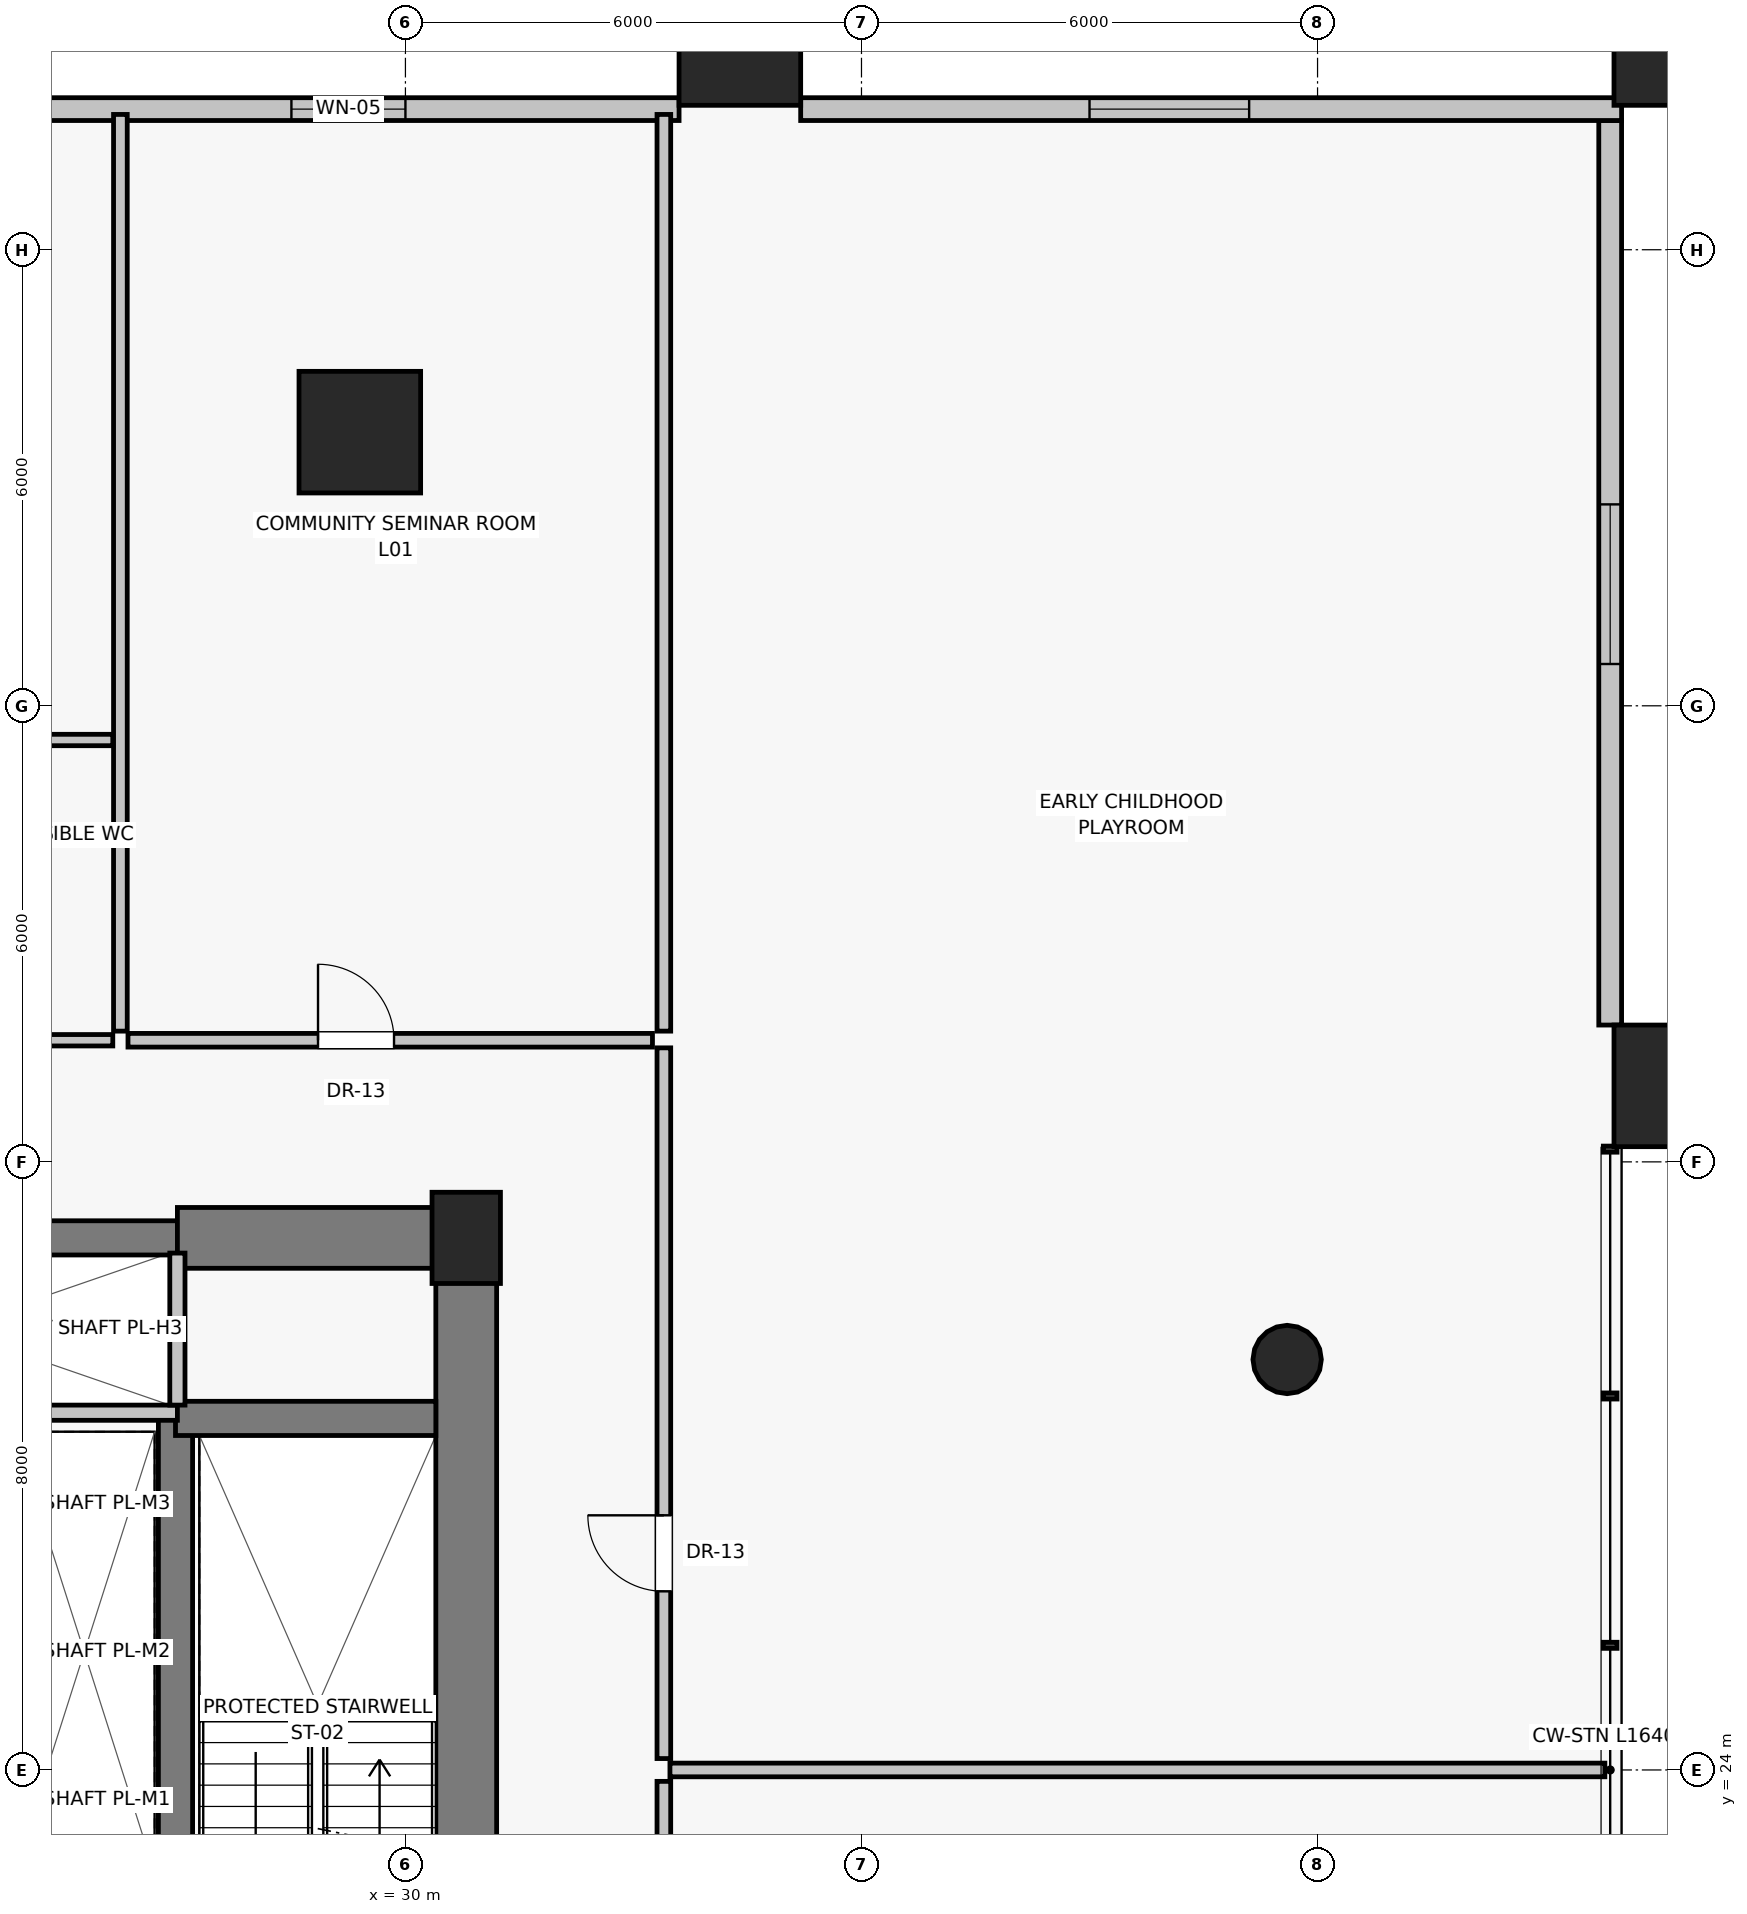
"""IFC4 building model, lengths in metres.
Left out: names, types, materials, properties, quantities, classifications, styles, units other than length and angle.
Written with IfcOpenShell. Run it as: python <this file> out.ifc"""

import sys

from ifc_helpers import new_model, si_unit, direction, frame, frame_2d, origin, origin_2d, place, context, subcontext, project, spatial, rectangle, circle, extrude, source, transform, mapped, element, fill, save


model = new_model("IFC4")
c1 = context("Model", 3, precision=1e-05, world=origin(), true_north=direction((0.0, 1.0)))
c2 = subcontext(c1, "Body", "Model", "MODEL_VIEW")
j1 = project(units=[si_unit("LENGTHUNIT", "METRE"), si_unit("PLANEANGLEUNIT", "RADIAN")], contexts=[c1])
p1 = place(None, origin())
s1 = spatial("IfcSite", under=j1, at=p1, CompositionType="ELEMENT")
p2 = place(p1, origin())
s2 = spatial("IfcBuilding", under=s1, at=p2, CompositionType="ELEMENT")
p3 = place(p2, frame((0.0, 0.0, 5.2)))
s3 = spatial("IfcBuildingStorey", under=s2, at=p3, CompositionType="ELEMENT", Elevation=5.2)
p4 = place(p3, frame((30.8, 31.0, 0.0), z_axis=(0.0, 0.0, 1.0), x_axis=(1.0, 0.0, 0.0)))
e1 = element("IfcColumn", 1, at=p4, inside=s3, PredefinedType="PILASTER", context=c2, shape_type="SweptSolid", body=[
    extrude(rectangle(XDim=0.9, YDim=1.2, at=origin_2d()), origin(), (0.0, 0.0, 1.0), 4.4),
])
for number, where, z_axis, x_axis in (
    (2, (46.7, 33.0, 0.0), (0.0, 0.0, 1.0), (1.0, 0.0, 0.0)),
    (3, (34.4, 46.7, 0.0), (0.0, 0.0, 1.0), (1.0, 0.0, 0.0)),
    (4, (46.7, 46.7, 0.0), (0.0, 0.0, 1.0), (1.0, 0.0, 0.0)),
):
    element("IfcColumn", number, at=place(p3, frame(where, z_axis=z_axis, x_axis=x_axis)), inside=s3, PredefinedType="COLUMN", context=c2, shape_type="SweptSolid", body=[
        extrude(rectangle(XDim=1.6, YDim=1.6, at=origin_2d()), origin(), (0.0, 0.0, 1.0), 4.4),
    ])
p5 = place(p3, frame((41.6, 29.4, 0.0), z_axis=(0.0, 0.0, 1.0), x_axis=(1.0, 0.0, 0.0)))
e5 = element("IfcColumn", 5, at=p5, inside=s3, PredefinedType="COLUMN", context=c2, shape_type="SweptSolid", body=[
    extrude(circle(Radius=0.45, at=origin_2d()), origin(), (0.0, 0.0, 1.0), 4.4),
])
p6 = place(p3, frame((29.4, 41.6, 0.0), z_axis=(0.0, 0.0, 1.0), x_axis=(1.0, 0.0, 0.0)))
e6 = element("IfcColumn", 6, at=p6, inside=s3, PredefinedType="COLUMN", context=c2, shape_type="SweptSolid", body=[
    extrude(rectangle(XDim=1.6, YDim=1.6, at=origin_2d()), origin(), (0.0, 0.0, 1.0), 4.4),
])
p7 = place(p3, frame((45.85, 33.8, 0.0), z_axis=(0.0, 0.0, 1.0), x_axis=(0.0, 1.0, 0.0)))
e7 = element("IfcWall", 7, at=p7, inside=s3, PredefinedType="SOLIDWALL", context=c2, shape_type="SweptSolid", body=[
    extrude(rectangle(XDim=11.9, YDim=0.3, at=frame_2d((5.95, 0.0))), origin(), (0.0, 0.0, 1.0), 3.0),
])
p8 = place(p7, frame((4.75, 0.0, 0.85)))
e8 = element("IfcOpeningElement", 8, at=p8, cuts=e7, PredefinedType="OPENING", context=c2, shape_type="SweptSolid", body=[
    extrude(rectangle(XDim=2.1, YDim=1.75, at=frame_2d((1.05, 0.875))), frame((0.0, 0.16, 0.0), z_axis=(0.0, -1.0, 0.0), x_axis=(1.0, 0.0, 0.0)), (0.0, 0.0, 1.0), 0.32),
])
p9 = place(p3, frame((46.0, 45.85, 0.0), z_axis=(0.0, 0.0, 1.0), x_axis=(-1.0, 0.0, 0.0)))
e9 = element("IfcWall", 9, at=p9, inside=s3, PredefinedType="SOLIDWALL", context=c2, shape_type="SweptSolid", body=[
    extrude(rectangle(XDim=10.8, YDim=0.3, at=frame_2d((5.4, 0.0))), origin(), (0.0, 0.0, 1.0), 3.0),
])
p10 = place(p9, frame((4.9, 0.0, 0.85)))
e10 = element("IfcOpeningElement", 10, at=p10, cuts=e9, PredefinedType="OPENING", context=c2, shape_type="SweptSolid", body=[
    extrude(rectangle(XDim=2.1, YDim=1.75, at=frame_2d((1.05, 0.875))), frame((0.0, 0.16, 0.0), z_axis=(0.0, -1.0, 0.0), x_axis=(1.0, 0.0, 0.0)), (0.0, 0.0, 1.0), 0.32),
])
p11 = place(p3, frame((33.6, 45.85, 0.0), z_axis=(0.0, 0.0, 1.0), x_axis=(-1.0, 0.0, 0.0)))
e11 = element("IfcWall", 11, at=p11, inside=s3, PredefinedType="SOLIDWALL", context=c2, shape_type="SweptSolid", body=[
    extrude(rectangle(XDim=8.8, YDim=0.3, at=frame_2d((4.4, 0.0))), origin(), (0.0, 0.0, 1.0), 3.0),
])
p12 = place(p11, frame((3.6, 0.0, 0.85)))
e12 = element("IfcOpeningElement", 12, at=p12, cuts=e11, PredefinedType="OPENING", context=c2, shape_type="SweptSolid", body=[
    extrude(rectangle(XDim=1.5, YDim=1.6, at=frame_2d((0.75, 0.8))), frame((0.0, 0.16, 0.0), z_axis=(0.0, -1.0, 0.0), x_axis=(1.0, 0.0, 0.0)), (0.0, 0.0, 1.0), 0.32),
])
p13 = place(p3, frame((30.8, 16.8, 0.0), z_axis=(0.0, 0.0, 1.0), x_axis=(0.0, 1.0, 0.0)))
e13 = element("IfcWall", 13, at=p13, inside=s3, PredefinedType="SHEAR", context=c2, shape_type="SweptSolid", body=[
    extrude(rectangle(XDim=14.2, YDim=0.8, at=frame_2d((7.1, 0.0))), origin(), (0.0, 0.0, 1.0), 4.1),
])
p14 = place(p3, frame((21.0, 31.0, 0.0), z_axis=(0.0, 0.0, 1.0), x_axis=(1.0, 0.0, 0.0)))
e14 = element("IfcWall", 14, at=p14, inside=s3, PredefinedType="SHEAR", context=c2, shape_type="SweptSolid", body=[
    extrude(rectangle(XDim=6.0, YDim=0.45, at=frame_2d((3.0, 0.0))), origin(), (0.0, 0.0, 1.0), 4.1),
])
p15 = place(p3, frame((27.0, 31.0, 0.0), z_axis=(0.0, 0.0, 1.0), x_axis=(1.0, 0.0, 0.0)))
e15 = element("IfcWall", 15, at=p15, inside=s3, PredefinedType="SHEAR", context=c2, shape_type="SweptSolid", body=[
    extrude(rectangle(XDim=3.8, YDim=0.8, at=frame_2d((1.9, 0.0))), origin(), (0.0, 0.0, 1.0), 4.1),
])
p16 = place(p3, frame((26.975, 19.8, 0.0), z_axis=(0.0, 0.0, 1.0), x_axis=(0.0, 1.0, 0.0)))
e16 = element("IfcWall", 16, at=p16, inside=s3, PredefinedType="SHEAR", context=c2, shape_type="SweptSolid", body=[
    extrude(rectangle(XDim=8.825, YDim=0.45, at=frame_2d((4.413, 0.0))), origin(), (0.0, 0.0, 1.0), 4.1),
])
p17 = place(p3, frame((26.975, 28.625, 0.0), z_axis=(0.0, 0.0, 1.0), x_axis=(1.0, 0.0, 0.0)))
e17 = element("IfcWall", 17, at=p17, inside=s3, PredefinedType="SHEAR", context=c2, shape_type="SweptSolid", body=[
    extrude(rectangle(XDim=3.425, YDim=0.45, at=frame_2d((1.712, 0.0))), origin(), (0.0, 0.0, 1.0), 4.1),
])
p18 = place(p3, frame((21.0, 28.7, 0.0), z_axis=(0.0, 0.0, 1.0), x_axis=(1.0, 0.0, 0.0)))
e18 = element("IfcWall", 18, at=p18, inside=s3, PredefinedType="SOLIDWALL", context=c2, shape_type="SweptSolid", body=[
    extrude(rectangle(XDim=6.0, YDim=0.2, at=frame_2d((3.0, 0.0))), origin(), (0.0, 0.0, 1.0), 4.1),
])
p19 = place(p3, frame((27.0, 28.8, 0.0), z_axis=(0.0, 0.0, 1.0), x_axis=(0.0, 1.0, 0.0)))
e19 = element("IfcWall", 19, at=p19, inside=s3, PredefinedType="SOLIDWALL", context=c2, shape_type="SweptSolid", body=[
    extrude(rectangle(XDim=2.0, YDim=0.2, at=frame_2d((1.0, 0.0))), origin(), (0.0, 0.0, 1.0), 4.1),
])
p20 = place(p3, frame((33.4, 14.3, 0.0), z_axis=(0.0, 0.0, 1.0), x_axis=(0.0, 1.0, 0.0)))
e20 = element("IfcWall", 20, at=p20, inside=s3, PredefinedType="PARTITIONING", context=c2, shape_type="SweptSolid", body=[
    extrude(rectangle(XDim=9.55, YDim=0.18, at=frame_2d((4.775, 0.0))), origin(), (0.0, 0.0, 1.0), 4.1),
])
p21 = place(p20, frame((2.2, 0.0, 0.0)))
e21 = element("IfcOpeningElement", 21, at=p21, cuts=e20, PredefinedType="OPENING", context=c2, shape_type="SweptSolid", body=[
    extrude(rectangle(XDim=1.0, YDim=2.01, at=frame_2d((0.5, 1.005))), frame((0.0, 0.1, 0.0), z_axis=(0.0, -1.0, 0.0), x_axis=(1.0, 0.0, 0.0)), (0.0, 0.0, 1.0), 0.2),
])
p22 = place(p3, frame((33.4, 24.15, 0.0), z_axis=(0.0, 0.0, 1.0), x_axis=(0.0, 1.0, 0.0)))
e22 = element("IfcWall", 22, at=p22, inside=s3, PredefinedType="PARTITIONING", context=c2, shape_type="SweptSolid", body=[
    extrude(rectangle(XDim=9.35, YDim=0.18, at=frame_2d((4.675, 0.0))), origin(), (0.0, 0.0, 1.0), 4.1),
])
p23 = place(p22, frame((2.2, 0.0, 0.0)))
e23 = element("IfcOpeningElement", 23, at=p23, cuts=e22, PredefinedType="OPENING", context=c2, shape_type="SweptSolid", body=[
    extrude(rectangle(XDim=1.0, YDim=2.01, at=frame_2d((0.5, 1.005))), frame((0.0, 0.1, 0.0), z_axis=(0.0, -1.0, 0.0), x_axis=(1.0, 0.0, 0.0)), (0.0, 0.0, 1.0), 0.2),
])
p24 = place(p3, frame((33.48, 24.0, 0.0), z_axis=(0.0, 0.0, 1.0), x_axis=(1.0, 0.0, 0.0)))
e24 = element("IfcWall", 24, at=p24, inside=s3, PredefinedType="PARTITIONING", context=c2, shape_type="SweptSolid", body=[
    extrude(rectangle(XDim=12.3, YDim=0.18, at=frame_2d((6.15, 0.0))), origin(), (0.0, 0.0, 1.0), 4.1),
])
p25 = place(p3, frame((21.95, 33.6, 0.0), z_axis=(0.0, 0.0, 1.0), x_axis=(1.0, 0.0, 0.0)))
e25 = element("IfcWall", 25, at=p25, inside=s3, PredefinedType="PARTITIONING", context=c2, shape_type="SweptSolid", body=[
    extrude(rectangle(XDim=4.2, YDim=0.15, at=frame_2d((2.1, 0.0))), origin(), (0.0, 0.0, 1.0), 4.1),
])
p26 = place(p25, frame((1.5, 0.0, 0.0)))
e26 = element("IfcOpeningElement", 26, at=p26, cuts=e25, PredefinedType="OPENING", context=c2, shape_type="SweptSolid", body=[
    extrude(rectangle(XDim=1.0, YDim=2.01, at=frame_2d((0.5, 1.005))), frame((0.0, 0.085, 0.0), z_axis=(0.0, -1.0, 0.0), x_axis=(1.0, 0.0, 0.0)), (0.0, 0.0, 1.0), 0.17),
])
p27 = place(p3, frame((26.35, 33.6, 0.0), z_axis=(0.0, 0.0, 1.0), x_axis=(1.0, 0.0, 0.0)))
e27 = element("IfcWall", 27, at=p27, inside=s3, PredefinedType="PARTITIONING", context=c2, shape_type="SweptSolid", body=[
    extrude(rectangle(XDim=6.9, YDim=0.18, at=frame_2d((3.45, 0.0))), origin(), (0.0, 0.0, 1.0), 4.1),
])
p28 = place(p27, frame((2.5, 0.0, 0.0)))
e28 = element("IfcOpeningElement", 28, at=p28, cuts=e27, PredefinedType="OPENING", context=c2, shape_type="SweptSolid", body=[
    extrude(rectangle(XDim=1.0, YDim=2.01, at=frame_2d((0.5, 1.005))), frame((0.0, 0.1, 0.0), z_axis=(0.0, -1.0, 0.0), x_axis=(1.0, 0.0, 0.0)), (0.0, 0.0, 1.0), 0.2),
])
for number, where, z_axis, x_axis in (
    (29, (26.25, 33.72, 0.0), (0.0, 0.0, 1.0), (0.0, 1.0, 0.0)),
    (30, (33.4, 33.72, 0.0), (0.0, 0.0, 1.0), (0.0, 1.0, 0.0)),
):
    element("IfcWall", number, at=place(p3, frame(where, z_axis=z_axis, x_axis=x_axis)), inside=s3, PredefinedType="PARTITIONING", context=c2, shape_type="SweptSolid", body=[
        extrude(rectangle(XDim=12.06, YDim=0.18, at=frame_2d((6.03, 0.0))), origin(), (0.0, 0.0, 1.0), 4.1),
    ])
p29 = place(p3, frame((17.0, 37.55, 0.0), z_axis=(0.0, 0.0, 1.0), x_axis=(1.0, 0.0, 0.0)))
e31 = element("IfcWall", 31, at=p29, inside=s3, PredefinedType="PARTITIONING", context=c2, shape_type="SweptSolid", body=[
    extrude(rectangle(XDim=9.15, YDim=0.15, at=frame_2d((4.575, 0.0))), origin(), (0.0, 0.0, 1.0), 4.1),
])
m1 = source(origin(), c2, "Body", "SweptSolid", [
    extrude(rectangle(XDim=2.1, YDim=1.75, at=frame_2d((1.05, 0.875))), frame((0.0, 0.03, 0.0), z_axis=(0.0, -1.0, 0.0), x_axis=(1.0, 0.0, 0.0)), (0.0, 0.0, 1.0), 0.06),
])
p30 = place(p8, origin())
e32 = element("IfcWindow", 32, at=p30, inside=s3, PartitioningType="DOUBLE_PANEL_VERTICAL", PredefinedType="WINDOW", context=c2, shape_type="MappedRepresentation", body=[
    mapped(m1, transform((0.0, 0.0, 0.0), scale=1.0)),
])
fill(e8, e32)
p31 = place(p10, origin())
e33 = element("IfcWindow", 33, at=p31, inside=s3, PartitioningType="DOUBLE_PANEL_VERTICAL", PredefinedType="WINDOW", context=c2, shape_type="MappedRepresentation", body=[
    mapped(m1, transform((0.0, 0.0, 0.0), scale=1.0)),
])
fill(e10, e33)
m2 = source(origin(), c2, "Body", "SweptSolid", [
    extrude(rectangle(XDim=1.5, YDim=1.6, at=frame_2d((0.75, 0.8))), frame((0.0, 0.03, 0.0), z_axis=(0.0, -1.0, 0.0), x_axis=(1.0, 0.0, 0.0)), (0.0, 0.0, 1.0), 0.06),
])
p32 = place(p12, origin())
e34 = element("IfcWindow", 34, at=p32, inside=s3, PartitioningType="DOUBLE_PANEL_VERTICAL", PredefinedType="WINDOW", context=c2, shape_type="MappedRepresentation", body=[
    mapped(m2, transform((0.0, 0.0, 0.0), scale=1.0)),
])
fill(e12, e34)
m3 = source(origin(), c2, "Body", "SweptSolid", [
    extrude(rectangle(XDim=1.0, YDim=2.01, at=frame_2d((0.5, 1.005))), frame((0.0, 0.025, 0.0), z_axis=(0.0, -1.0, 0.0), x_axis=(1.0, 0.0, 0.0)), (0.0, 0.0, 1.0), 0.05),
])
p33 = place(p23, origin())
e35 = element("IfcDoor", 35, at=p33, inside=s3, OperationType="SINGLE_SWING_RIGHT", PredefinedType="DOOR", context=c2, shape_type="MappedRepresentation", body=[
    mapped(m3, transform((0.0, 0.0, 0.0), scale=1.0)),
])
fill(e23, e35)
p34 = place(p28, origin())
e36 = element("IfcDoor", 36, at=p34, inside=s3, OperationType="SINGLE_SWING_LEFT", PredefinedType="DOOR", context=c2, shape_type="MappedRepresentation", body=[
    mapped(m3, transform((0.0, 0.0, 0.0), scale=1.0)),
])
fill(e28, e36)
save(model, sys.argv[1])
